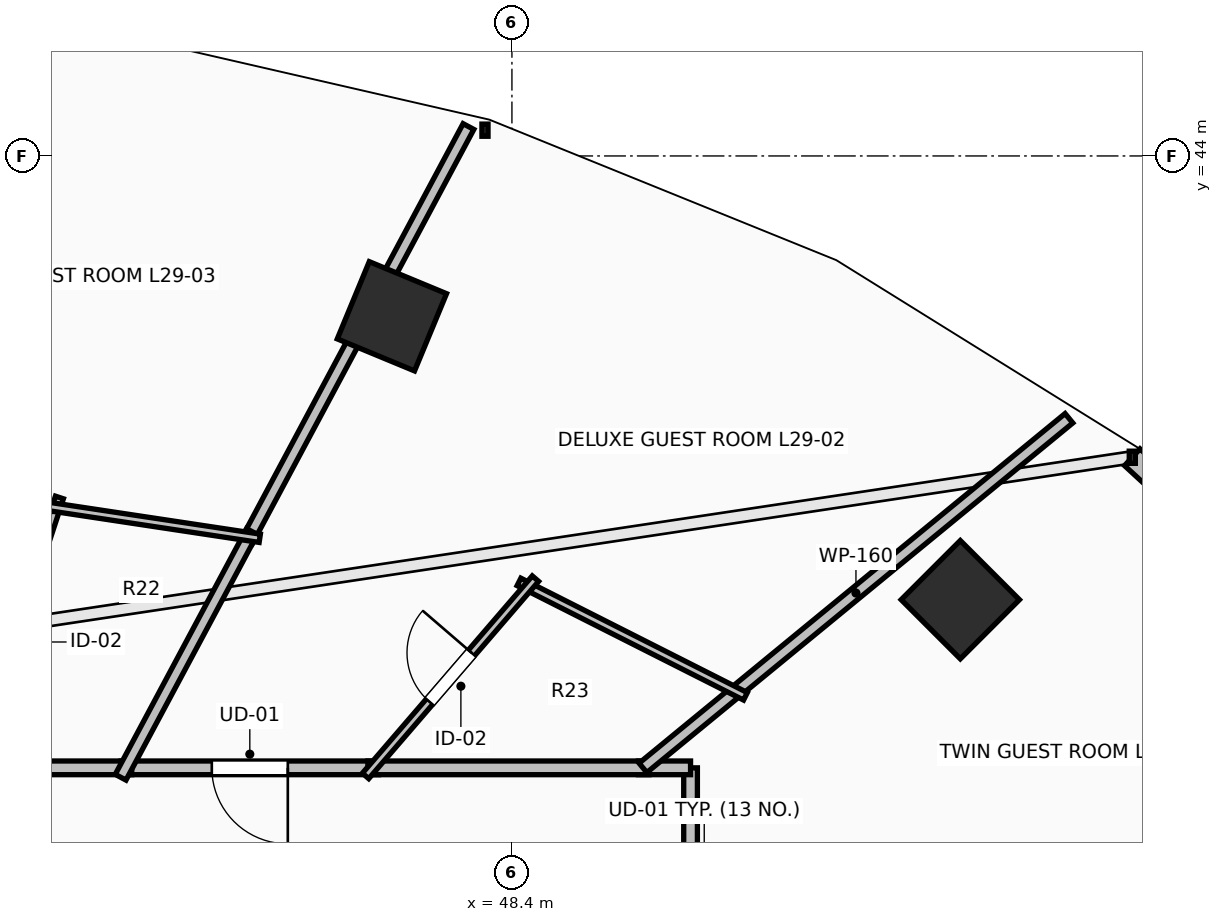
"""IFC4 building model, lengths in metres.
Left out: names, types, materials, properties, quantities, classifications, styles, units other than length and angle.
Written with IfcOpenShell. Run it as: python <this file> out.ifc"""

import sys

from ifc_helpers import new_model, si_unit, direction, frame, frame_2d, origin, origin_2d, place, context, subcontext, project, spatial, rectangle, extrude, element, fill, save


model = new_model("IFC4")
c1 = context("Model", 3, precision=1e-05, world=origin(), true_north=direction((0.0, 1.0)))
c2 = subcontext(c1, "Body", "Model", "MODEL_VIEW")
j1 = project(units=[si_unit("LENGTHUNIT", "METRE"), si_unit("PLANEANGLEUNIT", "RADIAN")], contexts=[c1])
p1 = place(None, origin())
s1 = spatial("IfcSite", under=j1, at=p1, CompositionType="ELEMENT")
p2 = place(p1, origin())
s2 = spatial("IfcBuilding", under=s1, at=p2, CompositionType="ELEMENT")
p3 = place(p2, frame((0.0, 0.0, 110.3)))
s3 = spatial("IfcBuildingStorey", under=s2, at=p3, CompositionType="ELEMENT", Elevation=110.3)
for number, where, z_axis, x_axis in (
    (1, (54.299, 38.162, 0.0), (0.0, 0.0, 1.0), (0.707, 0.707, 0.0)),
    (2, (46.821, 41.891, 0.0), (0.0, 0.0, 1.0), (0.383, 0.924, 0.0)),
):
    element("IfcColumn", number, at=place(p3, frame(where, z_axis=z_axis, x_axis=x_axis)), inside=s3, PredefinedType="COLUMN", context=c2, shape_type="SweptSolid", body=[
        extrude(rectangle(XDim=1.1, YDim=1.1, at=origin_2d()), origin(), (0.0, 0.0, 1.0), 3.5),
    ])
p4 = place(p3, frame((59.826, 37.028, 0.0), z_axis=(0.0, 0.0, 1.0), x_axis=(-0.735416718093, 0.677615119924, 0.0)))
e3 = element("IfcWall", 3, at=p4, inside=s3, PredefinedType="STANDARD", context=c2, shape_type="SweptSolid", body=[
    extrude(rectangle(XDim=4.439, YDim=0.3, at=frame_2d((2.22, 0.0))), origin(), (0.0, 0.0, 1.0), 3.24),
])
p5 = place(p4, frame((1.619, 0.0, 0.85)))
e4 = element("IfcOpeningElement", 4, at=p5, cuts=e3, PredefinedType="OPENING", context=c2, shape_type="SweptSolid", body=[
    extrude(rectangle(XDim=1.2, YDim=1.95, at=frame_2d((0.6, 0.975))), frame((0.0, 0.165, 0.0), z_axis=(0.0, -1.0, 0.0), x_axis=(1.0, 0.0, 0.0)), (0.0, 0.0, 1.0), 0.33),
])
p6 = place(p3, frame((50.75, 32.374, 0.0), z_axis=(0.0, 0.0, 1.0), x_axis=(0.0, 1.0, 0.0)))
e5 = element("IfcWall", 5, at=p6, inside=s3, PredefinedType="PARTITIONING", context=c2, shape_type="SweptSolid", body=[
    extrude(rectangle(XDim=3.576, YDim=0.18, at=frame_2d((1.788, 0.0))), origin(), (0.0, 0.0, 1.0), 2.432),
])
p7 = place(p6, frame((1.288, 0.0, 0.0)))
e6 = element("IfcOpeningElement", 6, at=p7, cuts=e5, PredefinedType="OPENING", context=c2, shape_type="SweptSolid", body=[
    extrude(rectangle(XDim=1.0, YDim=2.15, at=frame_2d((0.5, 1.075))), frame((0.0, 0.105, 0.0), z_axis=(0.0, -1.0, 0.0), x_axis=(1.0, 0.0, 0.0)), (0.0, 0.0, 1.0), 0.21),
])
p8 = place(p3, frame((50.75, 35.95, 0.0), z_axis=(0.0, 0.0, 1.0), x_axis=(-1.0, 0.0, 0.0)))
e7 = element("IfcWall", 7, at=p8, inside=s3, PredefinedType="PARTITIONING", context=c2, shape_type="SweptSolid", body=[
    extrude(rectangle(XDim=0.686, YDim=0.18, at=frame_2d((0.343, 0.0))), origin(), (0.0, 0.0, 1.0), 3.24),
])
p9 = place(p3, frame((46.645, 35.95, 0.0), z_axis=(0.0, 0.0, 1.0), x_axis=(-1.0, 0.0, 0.0)))
e8 = element("IfcWall", 8, at=p9, inside=s3, PredefinedType="PARTITIONING", context=c2, shape_type="SweptSolid", body=[
    extrude(rectangle(XDim=3.387, YDim=0.18, at=frame_2d((1.693, 0.0))), origin(), (0.0, 0.0, 1.0), 2.929),
])
p10 = place(p9, frame((1.194, 0.0, 0.0)))
e9 = element("IfcOpeningElement", 9, at=p10, cuts=e8, PredefinedType="OPENING", context=c2, shape_type="SweptSolid", body=[
    extrude(rectangle(XDim=1.0, YDim=2.15, at=frame_2d((0.5, 1.075))), frame((0.0, 0.105, 0.0), z_axis=(0.0, -1.0, 0.0), x_axis=(1.0, 0.0, 0.0)), (0.0, 0.0, 1.0), 0.21),
])
p11 = place(p3, frame((50.204, 35.95, 0.0), z_axis=(0.0, 0.0, 1.0), x_axis=(-1.0, 0.0, 0.0)))
e10 = element("IfcWall", 10, at=p11, inside=s3, PredefinedType="PARTITIONING", context=c2, shape_type="SweptSolid", body=[
    extrude(rectangle(XDim=3.699, YDim=0.18, at=frame_2d((1.85, 0.0))), origin(), (0.0, 0.0, 1.0), 2.432),
])
p12 = place(p3, frame((43.398, 35.95, 0.0), z_axis=(0.0, 0.0, 1.0), x_axis=(-1.0, 0.0, 0.0)))
e11 = element("IfcWall", 11, at=p12, inside=s3, PredefinedType="PARTITIONING", context=c2, shape_type="SweptSolid", body=[
    extrude(rectangle(XDim=2.199, YDim=0.18, at=frame_2d((1.1, 0.0))), origin(), (0.0, 0.0, 1.0), 3.24),
])
p13 = place(p3, frame((55.728, 40.549, 0.0), z_axis=(0.0, 0.0, 1.0), x_axis=(-0.773008157237, -0.634396081991, 0.0)))
e12 = element("IfcWall", 12, at=p13, inside=s3, PredefinedType="PARTITIONING", context=c2, shape_type="SweptSolid", body=[
    extrude(rectangle(XDim=7.25, YDim=0.16, at=frame_2d((3.625, 0.0))), origin(), (0.0, 0.0, 1.0), 2.677),
])
p14 = place(p3, frame((48.493, 38.396, 0.0), z_axis=(0.0, 0.0, 1.0), x_axis=(0.892546772035, -0.450954831142, 0.0)))
e13 = element("IfcWall", 13, at=p14, inside=s3, PredefinedType="PARTITIONING", context=c2, shape_type="SweptSolid", body=[
    extrude(rectangle(XDim=3.338, YDim=0.11, at=frame_2d((1.669, 0.0))), origin(), (0.0, 0.0, 1.0), 2.886),
])
p15 = place(p3, frame((46.475, 35.844, 0.0), z_axis=(0.0, 0.0, 1.0), x_axis=(0.652539053439, 0.757755094828, 0.0)))
e14 = element("IfcWall", 14, at=p15, inside=s3, PredefinedType="PARTITIONING", context=c2, shape_type="SweptSolid", body=[
    extrude(rectangle(XDim=3.425, YDim=0.11, at=frame_2d((1.712, 0.0))), origin(), (0.0, 0.0, 1.0), 2.432),
])
p16 = place(p15, frame((1.287, 0.0, 0.0)))
e15 = element("IfcOpeningElement", 15, at=p16, cuts=e14, PredefinedType="OPENING", context=c2, shape_type="SweptSolid", body=[
    extrude(rectangle(XDim=0.85, YDim=2.1, at=frame_2d((0.425, 1.05))), frame((0.0, 0.07, 0.0), z_axis=(0.0, -1.0, 0.0), x_axis=(1.0, 0.0, 0.0)), (0.0, 0.0, 1.0), 0.14),
])
p17 = place(p3, frame((47.828, 44.387, 0.0), z_axis=(0.0, 0.0, 1.0), x_axis=(-0.471360852561, -0.881940443949, 0.0)))
e16 = element("IfcWall", 16, at=p17, inside=s3, PredefinedType="PARTITIONING", context=c2, shape_type="SweptSolid", body=[
    extrude(rectangle(XDim=6.182, YDim=0.16, at=frame_2d((3.091, 0.0))), origin(), (0.0, 0.0, 1.0), 2.677),
])
p18 = place(p3, frame((44.98, 39.059, 0.0), z_axis=(0.0, 0.0, 1.0), x_axis=(-0.47142818978, -0.881904451673, 0.0)))
e17 = element("IfcWall", 17, at=p18, inside=s3, PredefinedType="PARTITIONING", context=c2, shape_type="SweptSolid", body=[
    extrude(rectangle(XDim=3.665, YDim=0.16, at=frame_2d((1.833, 0.0))), origin(), (0.0, 0.0, 1.0), 2.886),
])
p19 = place(p3, frame((41.232, 35.817, 0.0), z_axis=(0.0, 0.0, 1.0), x_axis=(0.312643466081, 0.949870550716, 0.0)))
e18 = element("IfcWall", 18, at=p19, inside=s3, PredefinedType="PARTITIONING", context=c2, shape_type="SweptSolid", body=[
    extrude(rectangle(XDim=3.885, YDim=0.11, at=frame_2d((1.942, 0.0))), origin(), (0.0, 0.0, 1.0), 2.886),
])
p20 = place(p19, frame((1.517, 0.0, 0.0)))
e19 = element("IfcOpeningElement", 19, at=p20, cuts=e18, PredefinedType="OPENING", context=c2, shape_type="SweptSolid", body=[
    extrude(rectangle(XDim=0.85, YDim=2.1, at=frame_2d((0.425, 1.05))), frame((0.0, 0.07, 0.0), z_axis=(0.0, -1.0, 0.0), x_axis=(1.0, 0.0, 0.0)), (0.0, 0.0, 1.0), 0.14),
])
p21 = place(p3, frame((42.265, 39.395, 0.0), z_axis=(0.0, 0.0, 1.0), x_axis=(0.988826742388, -0.149069358149, 0.0)))
e20 = element("IfcWall", 20, at=p21, inside=s3, PredefinedType="PARTITIONING", context=c2, shape_type="SweptSolid", body=[
    extrude(rectangle(XDim=2.85, YDim=0.11, at=frame_2d((1.425, 0.0))), origin(), (0.0, 0.0, 1.0), 2.886),
])
p22 = place(p10, origin())
e21 = element("IfcDoor", 21, at=p22, inside=s3, OperationType="SINGLE_SWING_LEFT", PredefinedType="DOOR", context=c2, shape_type="SweptSolid", body=[
    extrude(rectangle(XDim=1.0, YDim=2.15, at=frame_2d((0.5, 1.075))), frame((0.0, 0.025, 0.0), z_axis=(0.0, -1.0, 0.0), x_axis=(1.0, 0.0, 0.0)), (0.0, 0.0, 1.0), 0.05),
])
fill(e9, e21)
p23 = place(p16, origin())
e22 = element("IfcDoor", 22, at=p23, inside=s3, OperationType="SINGLE_SWING_RIGHT", PredefinedType="DOOR", context=c2, shape_type="SweptSolid", body=[
    extrude(rectangle(XDim=0.85, YDim=2.1, at=frame_2d((0.425, 1.05))), frame((0.0, 0.025, 0.0), z_axis=(0.0, -1.0, 0.0), x_axis=(1.0, 0.0, 0.0)), (0.0, 0.0, 1.0), 0.05),
])
fill(e15, e22)
save(model, sys.argv[1])
